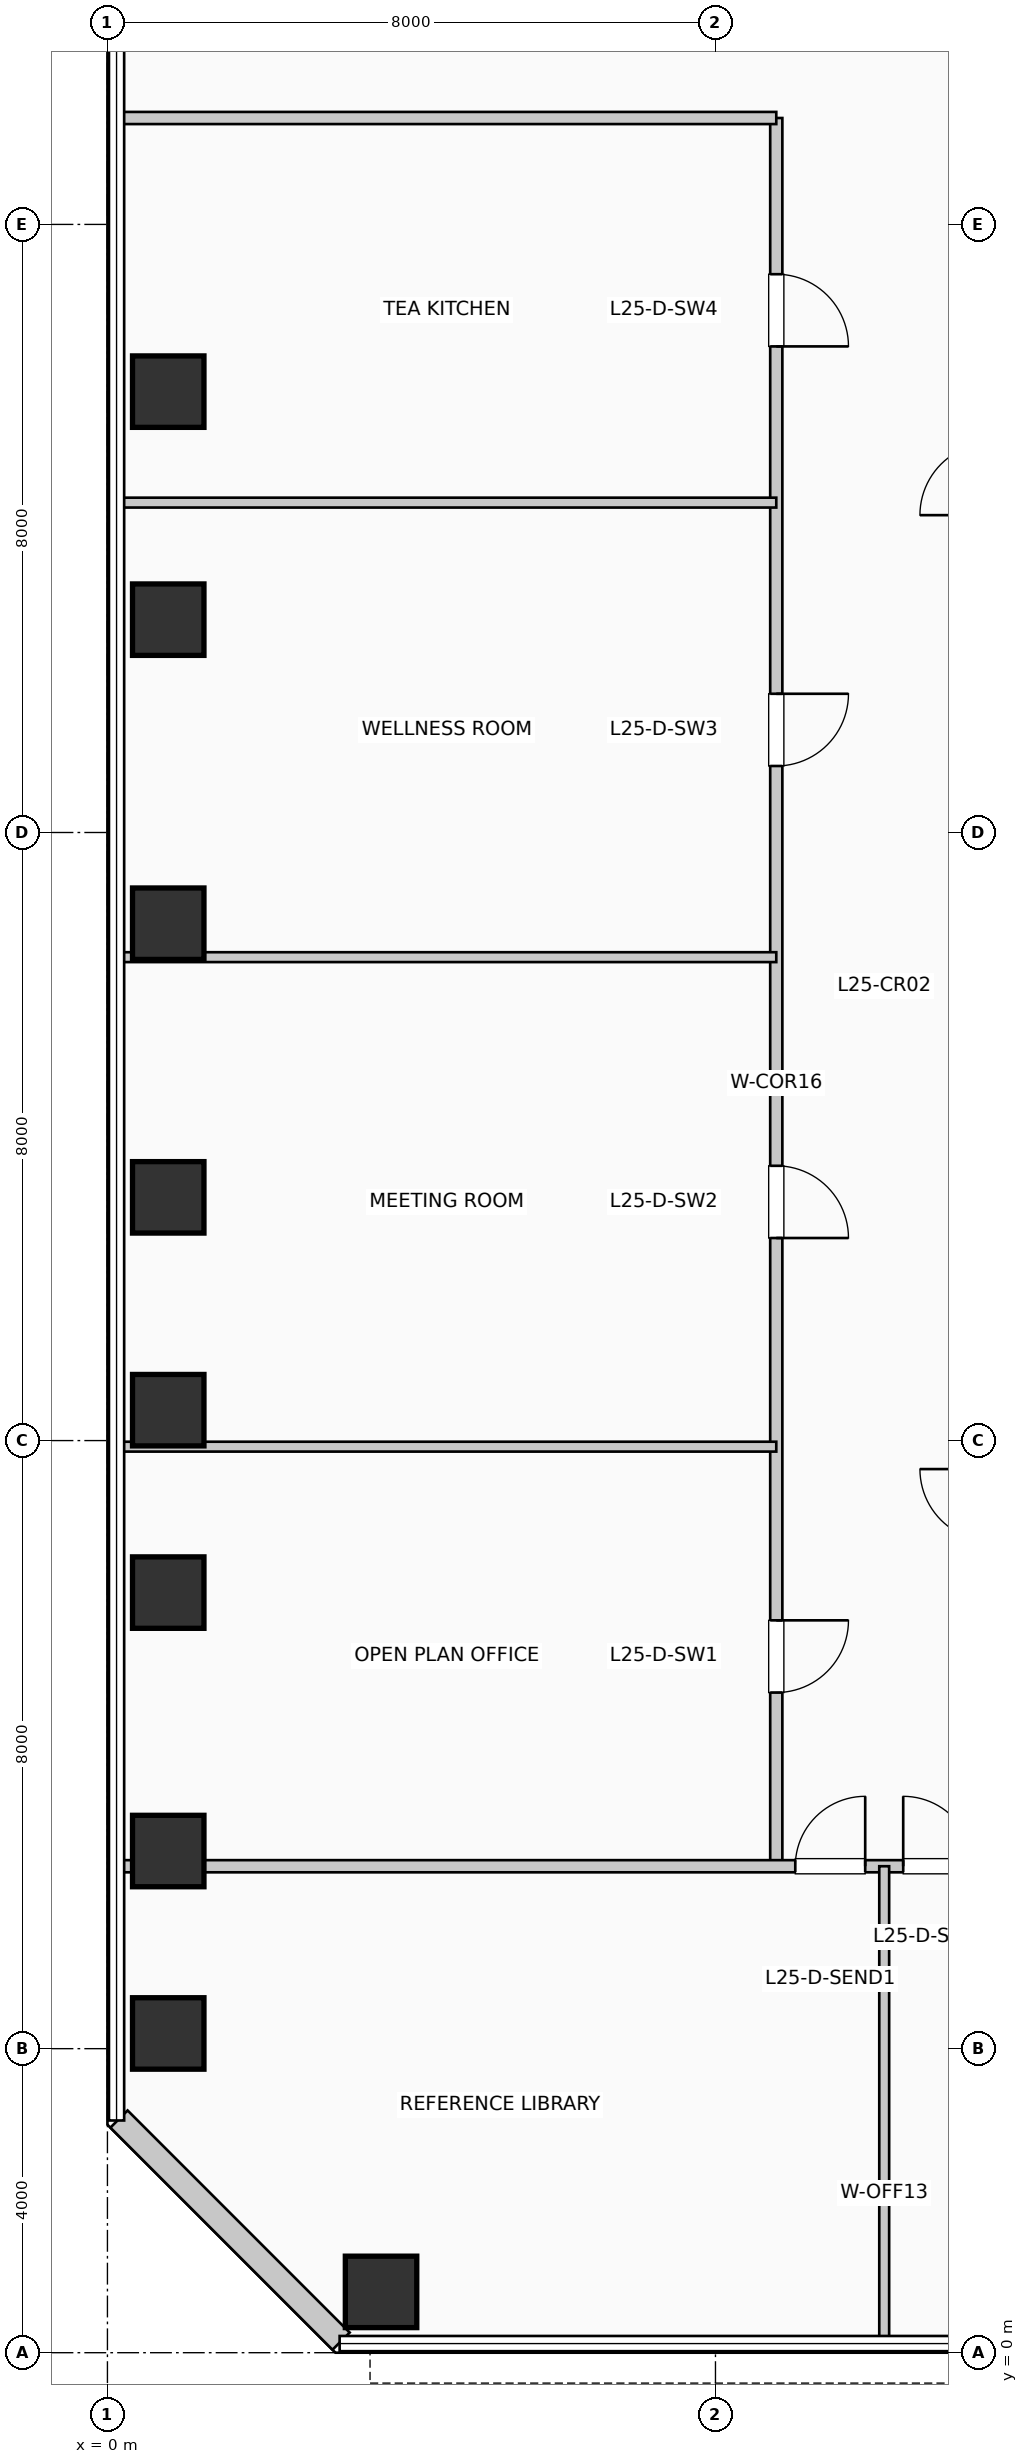
"""IFC4 building model, lengths in metres.
Left out: names, types, materials, properties, quantities, classifications, styles, units other than length and angle.
Written with IfcOpenShell. Run it as: python <this file> out.ifc"""

import sys

from ifc_helpers import new_model, si_unit, direction, frame, frame_2d, origin, origin_2d, place, context, subcontext, project, spatial, rectangle, extrude, element, fill, save


model = new_model("IFC4")
c1 = context("Model", 3, precision=1e-05, world=origin(), true_north=direction((0.0, 1.0)))
c2 = subcontext(c1, "Body", "Model", "MODEL_VIEW")
j1 = project(units=[si_unit("LENGTHUNIT", "METRE"), si_unit("PLANEANGLEUNIT", "RADIAN")], contexts=[c1])
p1 = place(None, origin())
s1 = spatial("IfcSite", under=j1, at=p1, CompositionType="ELEMENT")
p2 = place(p1, origin())
s2 = spatial("IfcBuilding", under=s1, at=p2, CompositionType="ELEMENT")
p3 = place(p2, frame((0.0, 0.0, 106.59)))
s3 = spatial("IfcBuildingStorey", under=s2, at=p3, CompositionType="ELEMENT", Elevation=106.59)
for number, where, z_axis, x_axis in (
    (1, (0.8, 4.2, 0.0), (0.0, 0.0, 1.0), (1.0, 0.0, 0.0)),
    (2, (0.8, 6.6, 0.0), (0.0, 0.0, 1.0), (1.0, 0.0, 0.0)),
    (3, (0.8, 10.0, 0.0), (0.0, 0.0, 1.0), (1.0, 0.0, 0.0)),
    (4, (0.8, 12.4, 0.0), (0.0, 0.0, 1.0), (1.0, 0.0, 0.0)),
    (5, (0.8, 15.2, 0.0), (0.0, 0.0, 1.0), (1.0, 0.0, 0.0)),
    (6, (0.8, 18.8, 0.0), (0.0, 0.0, 1.0), (1.0, 0.0, 0.0)),
    (7, (0.8, 22.8, 0.0), (0.0, 0.0, 1.0), (1.0, 0.0, 0.0)),
    (8, (0.8, 25.8, 0.0), (0.0, 0.0, 1.0), (1.0, 0.0, 0.0)),
    (9, (3.6, 0.8, 0.0), (0.0, 0.0, 1.0), (1.0, 0.0, 0.0)),
):
    element("IfcColumn", number, at=place(p3, frame(where, z_axis=z_axis, x_axis=x_axis)), inside=s3, PredefinedType="COLUMN", context=c2, shape_type="SweptSolid", body=[
        extrude(rectangle(XDim=0.94, YDim=0.94, at=origin_2d()), origin(), (0.0, 0.0, 1.0), 3.96),
    ])
p4 = place(p3, frame((0.152, 3.074, 0.0), z_axis=(0.0, 0.0, 1.0), x_axis=(0.707106781187, -0.707106781187, 0.0)))
e10 = element("IfcWall", 10, at=p4, inside=s3, PredefinedType="SOLIDWALL", context=c2, shape_type="SweptSolid", body=[
    extrude(rectangle(XDim=4.133, YDim=0.32, at=frame_2d((2.066, 0.0))), origin(), (0.0, 0.0, 1.0), 3.71),
])
p5 = place(p3, frame((8.8, 6.4, 0.0), z_axis=(0.0, 0.0, 1.0), x_axis=(0.0, 1.0, 0.0)))
e11 = element("IfcWall", 11, at=p5, inside=s3, PredefinedType="PARTITIONING", context=c2, shape_type="SweptSolid", body=[
    extrude(rectangle(XDim=23.0, YDim=0.16, at=frame_2d((11.5, 0.0))), origin(), (0.0, 0.0, 1.0), 3.71),
])
p6 = place(p5, frame((3.235, 0.0, 0.0), z_axis=(0.0, 0.0, 1.0), x_axis=(-1.0, 0.0, 0.0)))
e12 = element("IfcOpeningElement", 12, at=p6, cuts=e11, PredefinedType="OPENING", context=c2, shape_type="SweptSolid", body=[
    extrude(rectangle(XDim=0.95, YDim=2.15, at=frame_2d((0.475, 1.075))), frame((0.0, 0.09, 0.0), z_axis=(0.0, -1.0, 0.0), x_axis=(1.0, 0.0, 0.0)), (0.0, 0.0, 1.0), 0.18),
])
p7 = place(p5, frame((9.215, 0.0, 0.0), z_axis=(0.0, 0.0, 1.0), x_axis=(-1.0, 0.0, 0.0)))
e13 = element("IfcOpeningElement", 13, at=p7, cuts=e11, PredefinedType="OPENING", context=c2, shape_type="SweptSolid", body=[
    extrude(rectangle(XDim=0.95, YDim=2.15, at=frame_2d((0.475, 1.075))), frame((0.0, 0.09, 0.0), z_axis=(0.0, -1.0, 0.0), x_axis=(1.0, 0.0, 0.0)), (0.0, 0.0, 1.0), 0.18),
])
p8 = place(p5, frame((15.425, 0.0, 0.0), z_axis=(0.0, 0.0, 1.0), x_axis=(-1.0, 0.0, 0.0)))
e14 = element("IfcOpeningElement", 14, at=p8, cuts=e11, PredefinedType="OPENING", context=c2, shape_type="SweptSolid", body=[
    extrude(rectangle(XDim=0.95, YDim=2.15, at=frame_2d((0.475, 1.075))), frame((0.0, 0.09, 0.0), z_axis=(0.0, -1.0, 0.0), x_axis=(1.0, 0.0, 0.0)), (0.0, 0.0, 1.0), 0.18),
])
p9 = place(p5, frame((20.945, 0.0, 0.0), z_axis=(0.0, 0.0, 1.0), x_axis=(-1.0, 0.0, 0.0)))
e15 = element("IfcOpeningElement", 15, at=p9, cuts=e11, PredefinedType="OPENING", context=c2, shape_type="SweptSolid", body=[
    extrude(rectangle(XDim=0.95, YDim=2.15, at=frame_2d((0.475, 1.075))), frame((0.0, 0.09, 0.0), z_axis=(0.0, -1.0, 0.0), x_axis=(1.0, 0.0, 0.0)), (0.0, 0.0, 1.0), 0.18),
])
p10 = place(p3, frame((0.19, 6.4, 0.0), z_axis=(0.0, 0.0, 1.0), x_axis=(1.0, 0.0, 0.0)))
e16 = element("IfcWall", 16, at=p10, inside=s3, PredefinedType="PARTITIONING", context=c2, shape_type="SweptSolid", body=[
    extrude(rectangle(XDim=23.26, YDim=0.16, at=frame_2d((11.63, 0.0))), origin(), (0.0, 0.0, 1.0), 2.995),
])
p11 = place(p10, frame((8.86, 0.0, 0.0)))
e17 = element("IfcOpeningElement", 17, at=p11, cuts=e16, PredefinedType="OPENING", context=c2, shape_type="SweptSolid", body=[
    extrude(rectangle(XDim=0.92, YDim=2.1, at=frame_2d((0.46, 1.05))), frame((0.0, 0.09, 0.0), z_axis=(0.0, -1.0, 0.0), x_axis=(1.0, 0.0, 0.0)), (0.0, 0.0, 1.0), 0.18),
])
p12 = place(p10, frame((10.28, 0.0, 0.0)))
e18 = element("IfcOpeningElement", 18, at=p12, cuts=e16, PredefinedType="OPENING", context=c2, shape_type="SweptSolid", body=[
    extrude(rectangle(XDim=0.92, YDim=2.1, at=frame_2d((0.46, 1.05))), frame((0.0, 0.09, 0.0), z_axis=(0.0, -1.0, 0.0), x_axis=(1.0, 0.0, 0.0)), (0.0, 0.0, 1.0), 0.18),
])
p13 = place(p3, frame((0.19, 29.4, 0.0), z_axis=(0.0, 0.0, 1.0), x_axis=(1.0, 0.0, 0.0)))
e19 = element("IfcWall", 19, at=p13, inside=s3, PredefinedType="PARTITIONING", context=c2, shape_type="SweptSolid", body=[
    extrude(rectangle(XDim=8.61, YDim=0.16, at=frame_2d((4.305, 0.0))), origin(), (0.0, 0.0, 1.0), 3.365),
])
p14 = place(p3, frame((10.22, 0.19, 0.0), z_axis=(0.0, 0.0, 1.0), x_axis=(0.0, 1.0, 0.0)))
e20 = element("IfcWall", 20, at=p14, inside=s3, PredefinedType="PARTITIONING", context=c2, shape_type="SweptSolid", body=[
    extrude(rectangle(XDim=6.21, YDim=0.13, at=frame_2d((3.105, 0.0))), origin(), (0.0, 0.0, 1.0), 3.71),
])
p15 = place(p3, frame((0.19, 11.92, 0.0), z_axis=(0.0, 0.0, 1.0), x_axis=(1.0, 0.0, 0.0)))
e21 = element("IfcWall", 21, at=p15, inside=s3, PredefinedType="PARTITIONING", context=c2, shape_type="SweptSolid", body=[
    extrude(rectangle(XDim=8.61, YDim=0.13, at=frame_2d((4.305, 0.0))), origin(), (0.0, 0.0, 1.0), 3.71),
])
p16 = place(p3, frame((0.19, 18.36, 0.0), z_axis=(0.0, 0.0, 1.0), x_axis=(1.0, 0.0, 0.0)))
e22 = element("IfcWall", 22, at=p16, inside=s3, PredefinedType="PARTITIONING", context=c2, shape_type="SweptSolid", body=[
    extrude(rectangle(XDim=8.61, YDim=0.13, at=frame_2d((4.305, 0.0))), origin(), (0.0, 0.0, 1.0), 2.995),
])
p17 = place(p3, frame((0.19, 24.34, 0.0), z_axis=(0.0, 0.0, 1.0), x_axis=(1.0, 0.0, 0.0)))
e23 = element("IfcWall", 23, at=p17, inside=s3, PredefinedType="PARTITIONING", context=c2, shape_type="SweptSolid", body=[
    extrude(rectangle(XDim=8.61, YDim=0.13, at=frame_2d((4.305, 0.0))), origin(), (0.0, 0.0, 1.0), 3.71),
])
p18 = place(p11, origin())
e24 = element("IfcDoor", 24, at=p18, inside=s3, OperationType="SINGLE_SWING_RIGHT", PredefinedType="DOOR", context=c2, shape_type="SweptSolid", body=[
    extrude(rectangle(XDim=0.92, YDim=2.1, at=frame_2d((0.46, 1.05))), frame((0.0, 0.025, 0.0), z_axis=(0.0, -1.0, 0.0), x_axis=(1.0, 0.0, 0.0)), (0.0, 0.0, 1.0), 0.05),
])
fill(e17, e24)
p19 = place(p12, origin())
e25 = element("IfcDoor", 25, at=p19, inside=s3, OperationType="SINGLE_SWING_LEFT", PredefinedType="DOOR", context=c2, shape_type="SweptSolid", body=[
    extrude(rectangle(XDim=0.92, YDim=2.1, at=frame_2d((0.46, 1.05))), frame((0.0, 0.025, 0.0), z_axis=(0.0, -1.0, 0.0), x_axis=(1.0, 0.0, 0.0)), (0.0, 0.0, 1.0), 0.05),
])
fill(e18, e25)
p20 = place(p6, origin())
e26 = element("IfcDoor", 26, at=p20, inside=s3, OperationType="SINGLE_SWING_RIGHT", PredefinedType="DOOR", context=c2, shape_type="SweptSolid", body=[
    extrude(rectangle(XDim=0.95, YDim=2.15, at=frame_2d((0.475, 1.075))), frame((0.0, 0.025, 0.0), z_axis=(0.0, -1.0, 0.0), x_axis=(1.0, 0.0, 0.0)), (0.0, 0.0, 1.0), 0.05),
])
fill(e12, e26)
p21 = place(p7, origin())
e27 = element("IfcDoor", 27, at=p21, inside=s3, OperationType="SINGLE_SWING_LEFT", PredefinedType="DOOR", context=c2, shape_type="SweptSolid", body=[
    extrude(rectangle(XDim=0.95, YDim=2.15, at=frame_2d((0.475, 1.075))), frame((0.0, 0.025, 0.0), z_axis=(0.0, -1.0, 0.0), x_axis=(1.0, 0.0, 0.0)), (0.0, 0.0, 1.0), 0.05),
])
fill(e13, e27)
p22 = place(p8, origin())
e28 = element("IfcDoor", 28, at=p22, inside=s3, OperationType="SINGLE_SWING_RIGHT", PredefinedType="DOOR", context=c2, shape_type="SweptSolid", body=[
    extrude(rectangle(XDim=0.95, YDim=2.15, at=frame_2d((0.475, 1.075))), frame((0.0, 0.025, 0.0), z_axis=(0.0, -1.0, 0.0), x_axis=(1.0, 0.0, 0.0)), (0.0, 0.0, 1.0), 0.05),
])
fill(e14, e28)
p23 = place(p9, origin())
e29 = element("IfcDoor", 29, at=p23, inside=s3, OperationType="SINGLE_SWING_LEFT", PredefinedType="DOOR", context=c2, shape_type="SweptSolid", body=[
    extrude(rectangle(XDim=0.95, YDim=2.15, at=frame_2d((0.475, 1.075))), frame((0.0, 0.025, 0.0), z_axis=(0.0, -1.0, 0.0), x_axis=(1.0, 0.0, 0.0)), (0.0, 0.0, 1.0), 0.05),
])
fill(e15, e29)
save(model, sys.argv[1])
